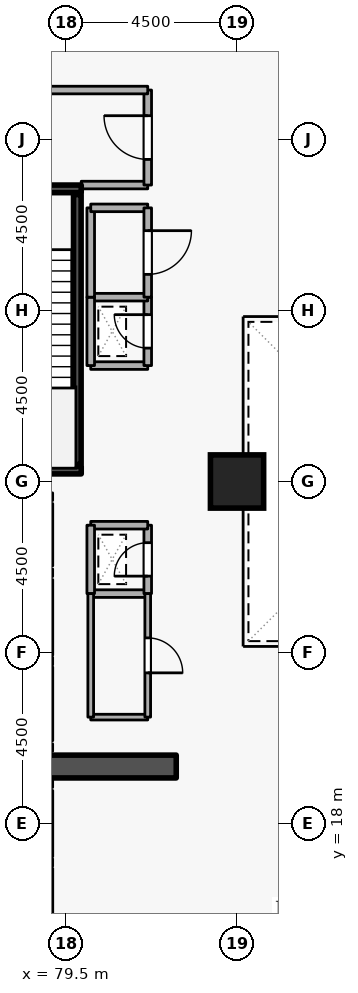
"""IFC4 building model, lengths in metres.
Left out: names, types, materials, properties, quantities, classifications, styles, units other than length and angle.
Written with IfcOpenShell. Run it as: python <this file> out.ifc"""

import sys

from ifc_helpers import new_model, si_unit, direction, frame, frame_2d, origin, origin_2d, place, context, subcontext, project, spatial, rectangle, extrude, element, fill, save


model = new_model("IFC4")
c1 = context("Model", 3, precision=1e-05, world=origin(), true_north=direction((0.0, 1.0)))
c2 = subcontext(c1, "Body", "Model", "MODEL_VIEW")
j1 = project(units=[si_unit("LENGTHUNIT", "METRE"), si_unit("PLANEANGLEUNIT", "RADIAN")], contexts=[c1])
p1 = place(None, origin())
s1 = spatial("IfcSite", under=j1, at=p1, CompositionType="ELEMENT")
p2 = place(p1, origin())
s2 = spatial("IfcBuilding", under=s1, at=p2, CompositionType="ELEMENT")
p3 = place(p2, frame((0.0, 0.0, 18.6)))
s3 = spatial("IfcBuildingStorey", under=s2, at=p3, CompositionType="ELEMENT", Elevation=18.6)
p4 = place(p3, frame((76.7, 19.5, 0.0), z_axis=(0.0, 0.0, 1.0), x_axis=(1.0, 0.0, 0.0)))
e1 = element("IfcWall", 1, at=p4, inside=s3, PredefinedType="SHEAR", context=c2, shape_type="SweptSolid", body=[
    extrude(rectangle(XDim=5.7, YDim=0.6, at=frame_2d((2.85, 0.0))), origin(), (0.0, 0.0, 1.0), 4.5),
])
p5 = place(p3, frame((84.0, 27.0, 0.0), z_axis=(0.0, 0.0, 1.0), x_axis=(1.0, 0.0, 0.0)))
e2 = element("IfcColumn", 2, at=p5, inside=s3, PredefinedType="COLUMN", context=c2, shape_type="SweptSolid", body=[
    extrude(rectangle(XDim=1.4, YDim=1.4, at=origin_2d()), origin(), (0.0, 0.0, 1.0), 4.5),
])
p6 = place(p3, frame((79.05, 24.78, 0.0), z_axis=(0.0, 0.0, 1.0), x_axis=(0.0, 1.0, 0.0)))
e3 = element("IfcWall", 3, at=p6, inside=s3, PredefinedType="STANDARD", context=c2, shape_type="SweptSolid", body=[
    extrude(rectangle(XDim=1.64, YDim=0.2, at=frame_2d((0.82, 0.0))), origin(), (0.0, 0.0, 1.0), 4.16),
])
p7 = place(p6, frame((0.31, 0.0, 0.0)))
e4 = element("IfcOpeningElement", 4, at=p7, cuts=e3, PredefinedType="OPENING", context=c2, shape_type="SweptSolid", body=[
    extrude(rectangle(XDim=1.02, YDim=2.06, at=frame_2d((0.51, 1.03))), frame((0.0, 0.11, 0.0), z_axis=(0.0, -1.0, 0.0), x_axis=(1.0, 0.0, 0.0)), (0.0, 0.0, 1.0), 0.22),
])
p8 = place(p3, frame((79.05, 22.43, 0.0), z_axis=(0.0, 0.0, 1.0), x_axis=(0.0, 1.0, 0.0)))
e5 = element("IfcWall", 5, at=p8, inside=s3, PredefinedType="STANDARD", context=c2, shape_type="SweptSolid", body=[
    extrude(rectangle(XDim=1.99, YDim=0.2, at=frame_2d((0.995, 0.0))), origin(), (0.0, 0.0, 1.0), 4.16),
])
p9 = place(p3, frame((79.05, 20.18, 0.0), z_axis=(0.0, 0.0, 1.0), x_axis=(0.0, 1.0, 0.0)))
e6 = element("IfcWall", 6, at=p9, inside=s3, PredefinedType="STANDARD", context=c2, shape_type="SweptSolid", body=[
    extrude(rectangle(XDim=1.94, YDim=0.2, at=frame_2d((0.97, 0.0))), origin(), (0.0, 0.0, 1.0), 4.16),
])
p10 = place(p3, frame((79.05, 17.13, 0.0), z_axis=(0.0, 0.0, 1.0), x_axis=(0.0, 1.0, 0.0)))
e7 = element("IfcWall", 7, at=p10, inside=s3, PredefinedType="STANDARD", context=c2, shape_type="SweptSolid", body=[
    extrude(rectangle(XDim=1.74, YDim=0.2, at=frame_2d((0.87, 0.0))), origin(), (0.0, 0.0, 1.0), 4.16),
])
p11 = place(p3, frame((79.05, 15.03, 0.0), z_axis=(0.0, 0.0, 1.0), x_axis=(0.0, 1.0, 0.0)))
e8 = element("IfcWall", 8, at=p11, inside=s3, PredefinedType="STANDARD", context=c2, shape_type="SweptSolid", body=[
    extrude(rectangle(XDim=1.79, YDim=0.2, at=frame_2d((0.895, 0.0))), origin(), (0.0, 0.0, 1.0), 4.16),
])
p12 = place(p3, frame((76.55, 34.7, 0.0), z_axis=(0.0, 0.0, 1.0), x_axis=(1.0, 0.0, 0.0)))
e9 = element("IfcWall", 9, at=p12, inside=s3, PredefinedType="SHEAR", context=c2, shape_type="SweptSolid", body=[
    extrude(rectangle(XDim=3.35, YDim=0.2, at=frame_2d((1.675, 0.0))), origin(), (0.0, 0.0, 1.0), 4.5),
])
p13 = place(p12, frame((1.125, 0.0, 0.0)))
e10 = element("IfcOpeningElement", 10, at=p13, cuts=e9, PredefinedType="OPENING", context=c2, shape_type="SweptSolid", body=[
    extrude(rectangle(XDim=1.1, YDim=2.1, at=frame_2d((0.55, 1.05))), frame((0.0, 0.11, 0.0), z_axis=(0.0, -1.0, 0.0), x_axis=(1.0, 0.0, 0.0)), (0.0, 0.0, 1.0), 0.22),
])
p14 = place(p3, frame((79.9, 27.3, 0.0), z_axis=(0.0, 0.0, 1.0), x_axis=(-1.0, 0.0, 0.0)))
e11 = element("IfcWall", 11, at=p14, inside=s3, PredefinedType="SHEAR", context=c2, shape_type="SweptSolid", body=[
    extrude(rectangle(XDim=3.35, YDim=0.2, at=frame_2d((1.675, 0.0))), origin(), (0.0, 0.0, 1.0), 4.5),
])
p15 = place(p3, frame((79.797, 27.45, 0.0), z_axis=(0.0, 0.0, 1.0), x_axis=(0.0, 1.0, 0.0)))
e12 = element("IfcWall", 12, at=p15, inside=s3, PredefinedType="SHEAR", context=c2, shape_type="SweptSolid", body=[
    extrude(rectangle(XDim=7.1, YDim=0.2, at=frame_2d((3.55, 0.0))), origin(), (0.0, 0.0, 1.0), 4.5),
])
p16 = place(p3, frame((79.9, 34.8, 0.0), z_axis=(0.0, 0.0, 1.0), x_axis=(1.0, 0.0, 0.0)))
e13 = element("IfcWall", 13, at=p16, inside=s3, PredefinedType="STANDARD", context=c2, shape_type="SweptSolid", body=[
    extrude(rectangle(XDim=1.75, YDim=0.2, at=frame_2d((0.875, 0.0))), origin(), (0.0, 0.0, 1.0), 3.365),
])
p17 = place(p3, frame((81.65, 34.8, 0.0), z_axis=(0.0, 0.0, 1.0), x_axis=(0.0, 1.0, 0.0)))
e14 = element("IfcWall", 14, at=p17, inside=s3, PredefinedType="STANDARD", context=c2, shape_type="SweptSolid", body=[
    extrude(rectangle(XDim=2.5, YDim=0.2, at=frame_2d((1.25, 0.0))), origin(), (0.0, 0.0, 1.0), 4.16),
])
p18 = place(p17, frame((0.675, 0.0, 0.0)))
e15 = element("IfcOpeningElement", 15, at=p18, cuts=e14, PredefinedType="OPENING", context=c2, shape_type="SweptSolid", body=[
    extrude(rectangle(XDim=1.15, YDim=2.1, at=frame_2d((0.575, 1.05))), frame((0.0, 0.11, 0.0), z_axis=(0.0, -1.0, 0.0), x_axis=(1.0, 0.0, 0.0)), (0.0, 0.0, 1.0), 0.22),
])
p19 = place(p3, frame((81.65, 37.3, 0.0), z_axis=(0.0, 0.0, 1.0), x_axis=(-1.0, 0.0, 0.0)))
e16 = element("IfcWall", 16, at=p19, inside=s3, PredefinedType="STANDARD", context=c2, shape_type="SweptSolid", body=[
    extrude(rectangle(XDim=5.15, YDim=0.2, at=frame_2d((2.575, 0.0))), origin(), (0.0, 0.0, 1.0), 4.16),
])
p20 = place(p3, frame((80.15, 24.05, 0.0), z_axis=(0.0, 0.0, 1.0), x_axis=(1.0, 0.0, 0.0)))
e17 = element("IfcWall", 17, at=p20, inside=s3, PredefinedType="STANDARD", context=c2, shape_type="SweptSolid", body=[
    extrude(rectangle(XDim=1.5, YDim=0.2, at=frame_2d((0.75, 0.0))), origin(), (0.0, 0.0, 1.0), 4.16),
])
p21 = place(p3, frame((81.65, 24.05, 0.0), z_axis=(0.0, 0.0, 1.0), x_axis=(0.0, 1.0, 0.0)))
e18 = element("IfcWall", 18, at=p21, inside=s3, PredefinedType="STANDARD", context=c2, shape_type="SweptSolid", body=[
    extrude(rectangle(XDim=1.8, YDim=0.2, at=frame_2d((0.9, 0.0))), origin(), (0.0, 0.0, 1.0), 4.16),
])
p22 = place(p21, frame((0.46, 0.0, 0.0)))
e19 = element("IfcOpeningElement", 19, at=p22, cuts=e18, PredefinedType="OPENING", context=c2, shape_type="SweptSolid", body=[
    extrude(rectangle(XDim=0.88, YDim=2.04, at=frame_2d((0.44, 1.02))), frame((0.0, 0.11, 0.0), z_axis=(0.0, -1.0, 0.0), x_axis=(1.0, 0.0, 0.0)), (0.0, 0.0, 1.0), 0.22),
])
p23 = place(p3, frame((81.65, 25.85, 0.0), z_axis=(0.0, 0.0, 1.0), x_axis=(-1.0, 0.0, 0.0)))
e20 = element("IfcWall", 20, at=p23, inside=s3, PredefinedType="STANDARD", context=c2, shape_type="SweptSolid", body=[
    extrude(rectangle(XDim=1.5, YDim=0.2, at=frame_2d((0.75, 0.0))), origin(), (0.0, 0.0, 1.0), 4.16),
])
p24 = place(p3, frame((80.15, 25.85, 0.0), z_axis=(0.0, 0.0, 1.0), x_axis=(0.0, -1.0, 0.0)))
e21 = element("IfcWall", 21, at=p24, inside=s3, PredefinedType="STANDARD", context=c2, shape_type="SweptSolid", body=[
    extrude(rectangle(XDim=1.8, YDim=0.2, at=frame_2d((0.9, 0.0))), origin(), (0.0, 0.0, 1.0), 4.16),
])
p25 = place(p3, frame((80.15, 30.05, 0.0), z_axis=(0.0, 0.0, 1.0), x_axis=(1.0, 0.0, 0.0)))
e22 = element("IfcWall", 22, at=p25, inside=s3, PredefinedType="STANDARD", context=c2, shape_type="SweptSolid", body=[
    extrude(rectangle(XDim=1.5, YDim=0.2, at=frame_2d((0.75, 0.0))), origin(), (0.0, 0.0, 1.0), 4.16),
])
p26 = place(p3, frame((81.65, 30.05, 0.0), z_axis=(0.0, 0.0, 1.0), x_axis=(0.0, 1.0, 0.0)))
e23 = element("IfcWall", 23, at=p26, inside=s3, PredefinedType="STANDARD", context=c2, shape_type="SweptSolid", body=[
    extrude(rectangle(XDim=1.8, YDim=0.2, at=frame_2d((0.9, 0.0))), origin(), (0.0, 0.0, 1.0), 4.16),
])
p27 = place(p26, frame((0.46, 0.0, 0.0)))
e24 = element("IfcOpeningElement", 24, at=p27, cuts=e23, PredefinedType="OPENING", context=c2, shape_type="SweptSolid", body=[
    extrude(rectangle(XDim=0.88, YDim=2.04, at=frame_2d((0.44, 1.02))), frame((0.0, 0.11, 0.0), z_axis=(0.0, -1.0, 0.0), x_axis=(1.0, 0.0, 0.0)), (0.0, 0.0, 1.0), 0.22),
])
p28 = place(p3, frame((81.65, 31.85, 0.0), z_axis=(0.0, 0.0, 1.0), x_axis=(-1.0, 0.0, 0.0)))
e25 = element("IfcWall", 25, at=p28, inside=s3, PredefinedType="STANDARD", context=c2, shape_type="SweptSolid", body=[
    extrude(rectangle(XDim=1.5, YDim=0.2, at=frame_2d((0.75, 0.0))), origin(), (0.0, 0.0, 1.0), 4.16),
])
p29 = place(p3, frame((80.15, 31.85, 0.0), z_axis=(0.0, 0.0, 1.0), x_axis=(0.0, -1.0, 0.0)))
e26 = element("IfcWall", 26, at=p29, inside=s3, PredefinedType="STANDARD", context=c2, shape_type="SweptSolid", body=[
    extrude(rectangle(XDim=1.8, YDim=0.2, at=frame_2d((0.9, 0.0))), origin(), (0.0, 0.0, 1.0), 4.16),
])
p30 = place(p3, frame((80.15, 31.85, 0.0), z_axis=(0.0, 0.0, 1.0), x_axis=(0.0, 1.0, 0.0)))
e27 = element("IfcWall", 27, at=p30, inside=s3, PredefinedType="STANDARD", context=c2, shape_type="SweptSolid", body=[
    extrude(rectangle(XDim=2.35, YDim=0.2, at=frame_2d((1.175, 0.0))), origin(), (0.0, 0.0, 1.0), 4.16),
])
p31 = place(p3, frame((80.15, 34.2, 0.0), z_axis=(0.0, 0.0, 1.0), x_axis=(1.0, 0.0, 0.0)))
e28 = element("IfcWall", 28, at=p31, inside=s3, PredefinedType="STANDARD", context=c2, shape_type="SweptSolid", body=[
    extrude(rectangle(XDim=1.5, YDim=0.2, at=frame_2d((0.75, 0.0))), origin(), (0.0, 0.0, 1.0), 3.365),
])
p32 = place(p3, frame((81.65, 34.2, 0.0), z_axis=(0.0, 0.0, 1.0), x_axis=(0.0, -1.0, 0.0)))
e29 = element("IfcWall", 29, at=p32, inside=s3, PredefinedType="STANDARD", context=c2, shape_type="SweptSolid", body=[
    extrude(rectangle(XDim=2.35, YDim=0.2, at=frame_2d((1.175, 0.0))), origin(), (0.0, 0.0, 1.0), 4.16),
])
p33 = place(p32, frame((0.6, 0.0, 0.0)))
e30 = element("IfcOpeningElement", 30, at=p33, cuts=e29, PredefinedType="OPENING", context=c2, shape_type="SweptSolid", body=[
    extrude(rectangle(XDim=1.15, YDim=2.1, at=frame_2d((0.575, 1.05))), frame((0.0, 0.11, 0.0), z_axis=(0.0, -1.0, 0.0), x_axis=(1.0, 0.0, 0.0)), (0.0, 0.0, 1.0), 0.22),
])
p34 = place(p3, frame((81.65, 20.8, 0.0), z_axis=(0.0, 0.0, 1.0), x_axis=(-1.0, 0.0, 0.0)))
e31 = element("IfcWall", 31, at=p34, inside=s3, PredefinedType="PARTITIONING", context=c2, shape_type="SweptSolid", body=[
    extrude(rectangle(XDim=1.5, YDim=0.15, at=frame_2d((0.75, 0.0))), origin(), (0.0, 0.0, 1.0), 4.16),
])
p35 = place(p3, frame((80.15, 20.8, 0.0), z_axis=(0.0, 0.0, 1.0), x_axis=(0.0, 1.0, 0.0)))
e32 = element("IfcWall", 32, at=p35, inside=s3, PredefinedType="PARTITIONING", context=c2, shape_type="SweptSolid", body=[
    extrude(rectangle(XDim=3.25, YDim=0.15, at=frame_2d((1.625, 0.0))), origin(), (0.0, 0.0, 1.0), 4.16),
])
p36 = place(p3, frame((81.65, 24.05, 0.0), z_axis=(0.0, 0.0, 1.0), x_axis=(0.0, -1.0, 0.0)))
e33 = element("IfcWall", 33, at=p36, inside=s3, PredefinedType="PARTITIONING", context=c2, shape_type="SweptSolid", body=[
    extrude(rectangle(XDim=3.25, YDim=0.15, at=frame_2d((1.625, 0.0))), origin(), (0.0, 0.0, 1.0), 4.16),
])
p37 = place(p36, frame((1.165, 0.0, 0.0)))
e34 = element("IfcOpeningElement", 34, at=p37, cuts=e33, PredefinedType="OPENING", context=c2, shape_type="SweptSolid", body=[
    extrude(rectangle(XDim=0.92, YDim=2.08, at=frame_2d((0.46, 1.04))), frame((0.0, 0.085, 0.0), z_axis=(0.0, -1.0, 0.0), x_axis=(1.0, 0.0, 0.0)), (0.0, 0.0, 1.0), 0.17),
])
p38 = place(p18, origin())
e35 = element("IfcDoor", 35, at=p38, inside=s3, OperationType="SINGLE_SWING_RIGHT", PredefinedType="DOOR", context=c2, shape_type="SweptSolid", body=[
    extrude(rectangle(XDim=1.15, YDim=2.1, at=frame_2d((0.575, 1.05))), frame((0.0, 0.025, 0.0), z_axis=(0.0, -1.0, 0.0), x_axis=(1.0, 0.0, 0.0)), (0.0, 0.0, 1.0), 0.05),
])
fill(e15, e35)
p39 = place(p22, origin())
e36 = element("IfcDoor", 36, at=p39, inside=s3, OperationType="SINGLE_SWING_LEFT", PredefinedType="DOOR", context=c2, shape_type="SweptSolid", body=[
    extrude(rectangle(XDim=0.88, YDim=2.04, at=frame_2d((0.44, 1.02))), frame((0.0, 0.025, 0.0), z_axis=(0.0, -1.0, 0.0), x_axis=(1.0, 0.0, 0.0)), (0.0, 0.0, 1.0), 0.05),
])
fill(e19, e36)
p40 = place(p27, origin())
e37 = element("IfcDoor", 37, at=p40, inside=s3, OperationType="SINGLE_SWING_RIGHT", PredefinedType="DOOR", context=c2, shape_type="SweptSolid", body=[
    extrude(rectangle(XDim=0.88, YDim=2.04, at=frame_2d((0.44, 1.02))), frame((0.0, 0.025, 0.0), z_axis=(0.0, -1.0, 0.0), x_axis=(1.0, 0.0, 0.0)), (0.0, 0.0, 1.0), 0.05),
])
fill(e24, e37)
p41 = place(p37, origin())
e38 = element("IfcDoor", 38, at=p41, inside=s3, OperationType="SINGLE_SWING_RIGHT", PredefinedType="DOOR", context=c2, shape_type="SweptSolid", body=[
    extrude(rectangle(XDim=0.92, YDim=2.08, at=frame_2d((0.46, 1.04))), frame((0.0, 0.025, 0.0), z_axis=(0.0, -1.0, 0.0), x_axis=(1.0, 0.0, 0.0)), (0.0, 0.0, 1.0), 0.05),
])
fill(e34, e38)
p42 = place(p33, origin())
e39 = element("IfcDoor", 39, at=p42, inside=s3, OperationType="SINGLE_SWING_LEFT", PredefinedType="DOOR", context=c2, shape_type="SweptSolid", body=[
    extrude(rectangle(XDim=1.15, YDim=2.1, at=frame_2d((0.575, 1.05))), frame((0.0, 0.025, 0.0), z_axis=(0.0, -1.0, 0.0), x_axis=(1.0, 0.0, 0.0)), (0.0, 0.0, 1.0), 0.05),
])
fill(e30, e39)
save(model, sys.argv[1])
